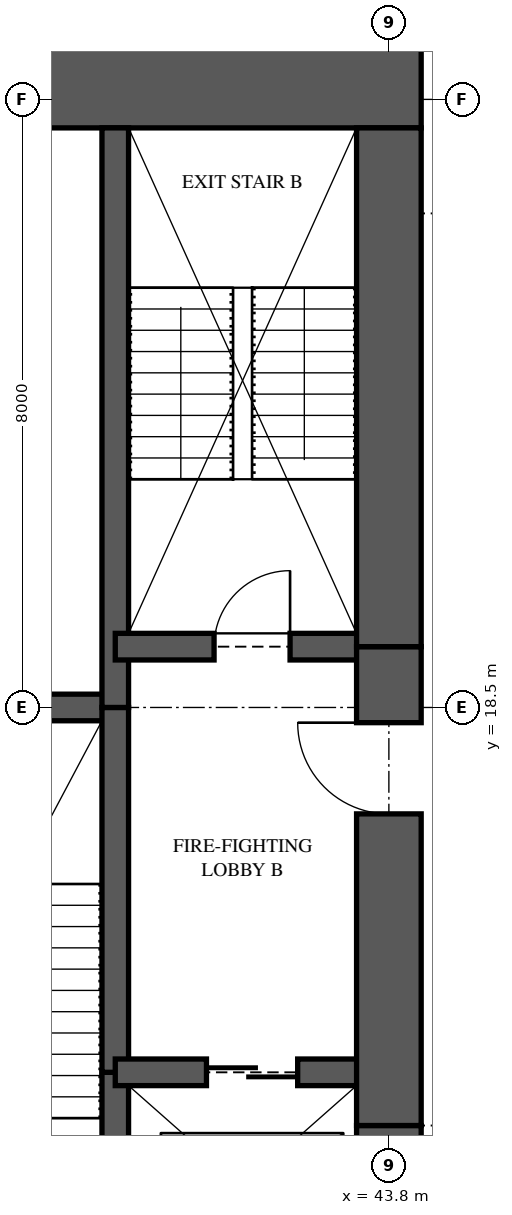
"""IFC4 building model, lengths in metres.
Left out: names, types, materials, properties, quantities, classifications, styles, units other than length and angle.
Written with IfcOpenShell. Run it as: python <this file> out.ifc"""

import sys

from ifc_helpers import new_model, si_unit, direction, frame, frame_2d, origin, place, context, subcontext, project, spatial, rectangle, extrude, element, fill, save


model = new_model("IFC4")
c1 = context("Model", 3, precision=1e-05, world=origin(), true_north=direction((0.0, 1.0)))
c2 = subcontext(c1, "Body", "Model", "MODEL_VIEW")
j1 = project(units=[si_unit("LENGTHUNIT", "METRE"), si_unit("PLANEANGLEUNIT", "RADIAN")], contexts=[c1])
p1 = place(None, origin())
s1 = spatial("IfcSite", under=j1, at=p1, CompositionType="ELEMENT")
p2 = place(p1, origin())
s2 = spatial("IfcBuilding", under=s1, at=p2, CompositionType="ELEMENT")
p3 = place(p2, frame((0.0, 0.0, 84.75)))
s3 = spatial("IfcBuildingStorey", under=s2, at=p3, CompositionType="ELEMENT", Elevation=84.75)
p4 = place(p3, frame((44.225, 26.875, 0.0), z_axis=(0.0, 0.0, 1.0), x_axis=(-1.0, 0.0, 0.0)))
e1 = element("IfcWall", 1, at=p4, inside=s3, PredefinedType="SHEAR", context=c2, shape_type="SweptSolid", body=[
    extrude(rectangle(XDim=8.325, YDim=1.5, at=frame_2d((4.163, 0.0))), origin(), (0.0, 0.0, 1.0), 3.35),
])
p5 = place(p4, frame((5.725, 0.0, 0.0)))
e2 = element("IfcOpeningElement", 2, at=p5, cuts=e1, PredefinedType="OPENING", context=c2, shape_type="SweptSolid", body=[
    extrude(rectangle(XDim=0.9, YDim=2.1, at=frame_2d((0.45, 1.05))), frame((0.0, 0.76, 0.0), z_axis=(0.0, -1.0, 0.0), x_axis=(1.0, 0.0, 0.0)), (0.0, 0.0, 1.0), 1.52),
])
p6 = place(p3, frame((43.8, 10.875, 0.0), z_axis=(0.0, 0.0, 1.0), x_axis=(0.0, 1.0, 0.0)))
e3 = element("IfcWall", 3, at=p6, inside=s3, PredefinedType="SHEAR", context=c2, shape_type="SweptSolid", body=[
    extrude(rectangle(XDim=2.125, YDim=0.85, at=frame_2d((1.062, 0.0))), origin(), (0.0, 0.0, 1.0), 3.35),
])
p7 = place(p3, frame((43.8, 13.0, 0.0), z_axis=(0.0, 0.0, 1.0), x_axis=(0.0, 1.0, 0.0)))
e4 = element("IfcWall", 4, at=p7, inside=s3, PredefinedType="SHEAR", context=c2, shape_type="SweptSolid", body=[
    extrude(rectangle(XDim=6.3, YDim=0.85, at=frame_2d((3.15, 0.0))), origin(), (0.0, 0.0, 1.0), 3.35),
])
p8 = place(p7, frame((4.1, 0.0, 0.0)))
e5 = element("IfcOpeningElement", 5, at=p8, cuts=e4, PredefinedType="OPENING", context=c2, shape_type="SweptSolid", body=[
    extrude(rectangle(XDim=1.2, YDim=2.2, at=frame_2d((0.6, 1.1))), frame((0.0, 0.435, 0.0), z_axis=(0.0, -1.0, 0.0), x_axis=(1.0, 0.0, 0.0)), (0.0, 0.0, 1.0), 0.87),
])
p9 = place(p3, frame((43.8, 19.3, 0.0), z_axis=(0.0, 0.0, 1.0), x_axis=(0.0, 1.0, 0.0)))
e6 = element("IfcWall", 6, at=p9, inside=s3, PredefinedType="SHEAR", context=c2, shape_type="SweptSolid", body=[
    extrude(rectangle(XDim=6.825, YDim=0.85, at=frame_2d((3.413, 0.0))), origin(), (0.0, 0.0, 1.0), 3.35),
])
p10 = place(p3, frame((40.2, 10.875, 0.0), z_axis=(0.0, 0.0, 1.0), x_axis=(0.0, 1.0, 0.0)))
e7 = element("IfcWall", 7, at=p10, inside=s3, PredefinedType="SHEAR", context=c2, shape_type="SweptSolid", body=[
    extrude(rectangle(XDim=2.825, YDim=0.35, at=frame_2d((1.413, 0.0))), origin(), (0.0, 0.0, 1.0), 3.35),
])
p11 = place(p3, frame((40.2, 13.7, 0.0), z_axis=(0.0, 0.0, 1.0), x_axis=(0.0, 1.0, 0.0)))
e8 = element("IfcWall", 8, at=p11, inside=s3, PredefinedType="SHEAR", context=c2, shape_type="SweptSolid", body=[
    extrude(rectangle(XDim=4.8, YDim=0.35, at=frame_2d((2.4, 0.0))), origin(), (0.0, 0.0, 1.0), 3.35),
])
p12 = place(p3, frame((40.2, 18.5, 0.0), z_axis=(0.0, 0.0, 1.0), x_axis=(0.0, 1.0, 0.0)))
e9 = element("IfcWall", 9, at=p12, inside=s3, PredefinedType="SHEAR", context=c2, shape_type="SweptSolid", body=[
    extrude(rectangle(XDim=7.625, YDim=0.35, at=frame_2d((3.812, 0.0))), origin(), (0.0, 0.0, 1.0), 3.35),
])
p13 = place(p3, frame((35.9, 18.5, 0.0), z_axis=(0.0, 0.0, 1.0), x_axis=(1.0, 0.0, 0.0)))
e10 = element("IfcWall", 10, at=p13, inside=s3, PredefinedType="SHEAR", context=c2, shape_type="SweptSolid", body=[
    extrude(rectangle(XDim=4.3, YDim=0.35, at=frame_2d((2.15, 0.0))), origin(), (0.0, 0.0, 1.0), 3.35),
])
p14 = place(p3, frame((40.2, 13.7, 0.0), z_axis=(0.0, 0.0, 1.0), x_axis=(1.0, 0.0, 0.0)))
e11 = element("IfcWall", 11, at=p14, inside=s3, PredefinedType="SHEAR", context=c2, shape_type="SweptSolid", body=[
    extrude(rectangle(XDim=3.6, YDim=0.35, at=frame_2d((1.8, 0.0))), origin(), (0.0, 0.0, 1.0), 3.35),
])
p15 = place(p14, frame((1.2, 0.0, 0.0)))
e12 = element("IfcOpeningElement", 12, at=p15, cuts=e11, PredefinedType="OPENING", context=c2, shape_type="SweptSolid", body=[
    extrude(rectangle(XDim=1.2, YDim=2.1, at=frame_2d((0.6, 1.05))), frame((0.0, 0.185, 0.0), z_axis=(0.0, -1.0, 0.0), x_axis=(1.0, 0.0, 0.0)), (0.0, 0.0, 1.0), 0.37),
])
p16 = place(p3, frame((40.2, 19.3, 0.0), z_axis=(0.0, 0.0, 1.0), x_axis=(1.0, 0.0, 0.0)))
e13 = element("IfcWall", 13, at=p16, inside=s3, PredefinedType="SHEAR", context=c2, shape_type="SweptSolid", body=[
    extrude(rectangle(XDim=3.6, YDim=0.35, at=frame_2d((1.8, 0.0))), origin(), (0.0, 0.0, 1.0), 3.35),
])
p17 = place(p16, frame((1.3, 0.0, 0.0)))
e14 = element("IfcOpeningElement", 14, at=p17, cuts=e13, PredefinedType="OPENING", context=c2, shape_type="SweptSolid", body=[
    extrude(rectangle(XDim=1.0, YDim=2.1, at=frame_2d((0.5, 1.05))), frame((0.0, 0.185, 0.0), z_axis=(0.0, -1.0, 0.0), x_axis=(1.0, 0.0, 0.0)), (0.0, 0.0, 1.0), 0.37),
])
p18 = place(p17, origin())
e15 = element("IfcDoor", 15, at=p18, inside=s3, OperationType="SINGLE_SWING_RIGHT", PredefinedType="DOOR", context=c2, shape_type="SweptSolid", body=[
    extrude(rectangle(XDim=1.0, YDim=2.1, at=frame_2d((0.5, 1.05))), frame((0.0, 0.025, 0.0), z_axis=(0.0, -1.0, 0.0), x_axis=(1.0, 0.0, 0.0)), (0.0, 0.0, 1.0), 0.05),
])
fill(e14, e15)
p19 = place(p8, origin())
e16 = element("IfcDoor", 16, at=p19, inside=s3, OperationType="SINGLE_SWING_RIGHT", PredefinedType="DOOR", context=c2, shape_type="SweptSolid", body=[
    extrude(rectangle(XDim=1.2, YDim=2.2, at=frame_2d((0.6, 1.1))), frame((0.0, 0.025, 0.0), z_axis=(0.0, -1.0, 0.0), x_axis=(1.0, 0.0, 0.0)), (0.0, 0.0, 1.0), 0.05),
])
fill(e5, e16)
p20 = place(p15, origin())
e17 = element("IfcDoor", 17, at=p20, inside=s3, OperationType="SLIDING_TO_LEFT", PredefinedType="DOOR", context=c2, shape_type="SweptSolid", body=[
    extrude(rectangle(XDim=1.2, YDim=2.1, at=frame_2d((0.6, 1.05))), frame((0.0, 0.025, 0.0), z_axis=(0.0, -1.0, 0.0), x_axis=(1.0, 0.0, 0.0)), (0.0, 0.0, 1.0), 0.05),
])
fill(e12, e17)
save(model, sys.argv[1])
